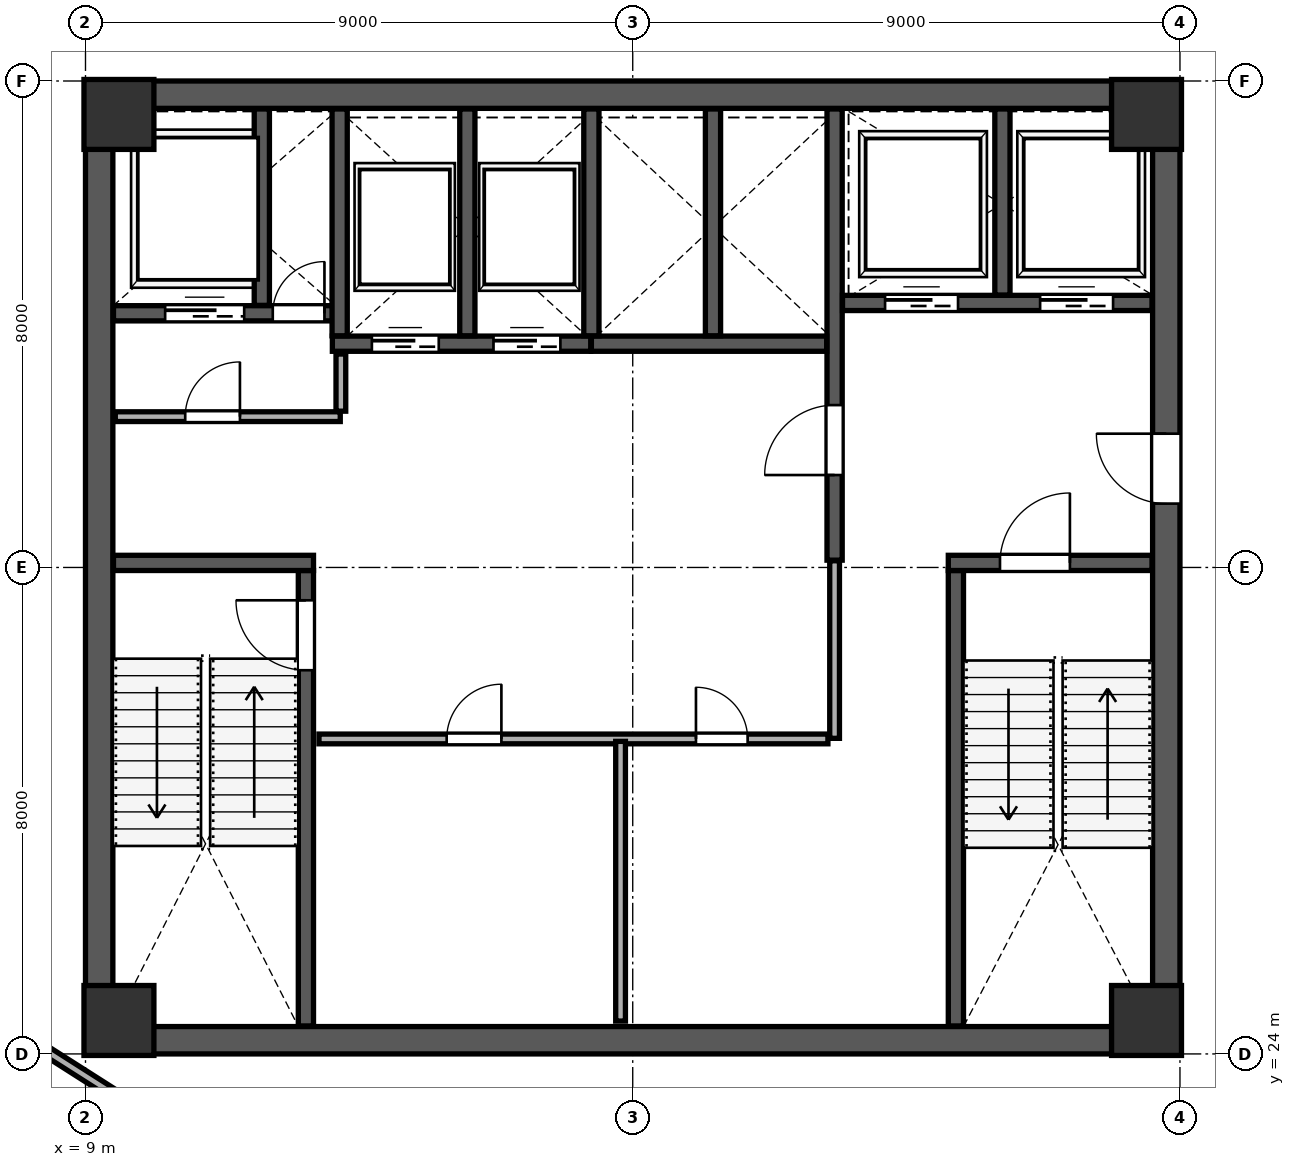
"""IFC4 building model, lengths in metres.
Left out: names, types, materials, properties, quantities, classifications, styles, units other than length and angle.
Written with IfcOpenShell. Run it as: python <this file> out.ifc"""

import sys

from ifc_helpers import new_model, si_unit, direction, frame, frame_2d, origin, origin_2d, place, context, subcontext, project, spatial, rectangle, extrude, clip, halfspace, source, transform, mapped, element, fill, save


model = new_model("IFC4")
c1 = context("Model", 3, precision=1e-05, world=origin(), true_north=direction((0.0, 1.0)))
c2 = subcontext(c1, "Body", "Model", "MODEL_VIEW")
j1 = project(units=[si_unit("LENGTHUNIT", "METRE"), si_unit("PLANEANGLEUNIT", "RADIAN")], contexts=[c1])
p1 = place(None, origin())
s1 = spatial("IfcSite", under=j1, at=p1, CompositionType="ELEMENT")
p2 = place(p1, origin())
s2 = spatial("IfcBuilding", under=s1, at=p2, CompositionType="ELEMENT")
p3 = place(p2, frame((0.0, 0.0, 191.8)))
s3 = spatial("IfcBuildingStorey", under=s2, at=p3, CompositionType="ELEMENT", Elevation=191.8)
m1 = source(origin(), c2, "Body", "SweptSolid", [
    extrude(rectangle(XDim=1.15, YDim=1.15, at=origin_2d()), origin(), (0.0, 0.0, 1.0), 4.198),
])
for number, where, z_axis, x_axis in (
    (1, (9.55, 24.55, 0.001), (0.0, 0.0, 1.0), (1.0, 0.0, 0.0)),
    (2, (26.45, 24.55, 0.001), (0.0, 0.0, 1.0), (1.0, 0.0, 0.0)),
    (3, (9.55, 39.45, 0.001), (0.0, 0.0, 1.0), (1.0, 0.0, 0.0)),
    (4, (26.45, 39.45, 0.001), (0.0, 0.0, 1.0), (1.0, 0.0, 0.0)),
):
    element("IfcColumn", number, at=place(p3, frame(where, z_axis=z_axis, x_axis=x_axis)), inside=s3, PredefinedType="COLUMN", context=c2, shape_type="MappedRepresentation", body=[
        mapped(m1, transform((0.0, 0.0, 0.0), scale=1.0)),
    ])
p4 = place(p3, frame((7.289, 41.053, 0.0), z_axis=(0.095793792698, 0.143375766237, 0.98502128857), x_axis=(0.407247881102, -0.908606350461, 0.092648061179)))
e5 = element("IfcColumn", 5, at=p4, inside=s3, PredefinedType="PILASTER", context=c2, shape_type="Clipping", body=[
    clip(clip(extrude(rectangle(XDim=0.9, YDim=1.3, at=origin_2d()), origin(), (0.0, 0.0, 1.0), 4.264), halfspace(frame((0.0, 0.0, 0.139), z_axis=(0.0, 0.0, -1.0), x_axis=(1.0, 0.0, 0.0)), False)), halfspace(frame((0.0, 0.0, 4.125), z_axis=(0.0, 0.0, 1.0), x_axis=(1.0, 0.0, 0.0)), False)),
])
p5 = place(p3, frame((9.225, 24.45, 0.0), z_axis=(0.0, 0.0, 1.0), x_axis=(0.0, 1.0, 0.0)))
e6 = element("IfcWall", 6, at=p5, inside=s3, PredefinedType="SHEAR", context=c2, shape_type="SweptSolid", body=[
    extrude(rectangle(XDim=15.1, YDim=0.45, at=frame_2d((7.55, 0.0))), origin(), (0.0, 0.0, 1.0), 3.96),
])
p6 = place(p3, frame((26.775, 24.45, 0.0), z_axis=(0.0, 0.0, 1.0), x_axis=(0.0, 1.0, 0.0)))
e7 = element("IfcWall", 7, at=p6, inside=s3, PredefinedType="SHEAR", context=c2, shape_type="SweptSolid", body=[
    extrude(rectangle(XDim=15.1, YDim=0.45, at=frame_2d((7.55, 0.0))), origin(), (0.0, 0.0, 1.0), 3.96),
])
p7 = place(p6, frame((8.6, 0.0, 0.0)))
e8 = element("IfcOpeningElement", 8, at=p7, cuts=e7, PredefinedType="OPENING", context=c2, shape_type="SweptSolid", body=[
    extrude(rectangle(XDim=1.15, YDim=2.2, at=frame_2d((0.575, 1.1))), frame((0.0, 0.235, 0.0), z_axis=(0.0, -1.0, 0.0), x_axis=(1.0, 0.0, 0.0)), (0.0, 0.0, 1.0), 0.47),
])
for number, where, z_axis, x_axis in (
    (9, (9.0, 24.225, 0.0), (0.0, 0.0, 1.0), (1.0, 0.0, 0.0)),
    (10, (9.0, 39.775, 0.0), (0.0, 0.0, 1.0), (1.0, 0.0, 0.0)),
):
    element("IfcWall", number, at=place(p3, frame(where, z_axis=z_axis, x_axis=x_axis)), inside=s3, PredefinedType="SHEAR", context=c2, shape_type="SweptSolid", body=[
        extrude(rectangle(XDim=18.0, YDim=0.45, at=frame_2d((9.0, 0.0))), origin(), (0.0, 0.0, 1.0), 3.96),
    ])
p8 = place(p3, frame((12.625, 24.46, 0.0), z_axis=(0.0, 0.0, 1.0), x_axis=(0.0, 1.0, 0.0)))
e11 = element("IfcWall", 11, at=p8, inside=s3, PredefinedType="SHEAR", context=c2, shape_type="SweptSolid", body=[
    extrude(rectangle(XDim=7.49, YDim=0.25, at=frame_2d((3.745, 0.0))), origin(), (0.0, 0.0, 1.0), 3.96),
])
p9 = place(p8, frame((5.85, 0.0, 0.0)))
e12 = element("IfcOpeningElement", 12, at=p9, cuts=e11, PredefinedType="OPENING", context=c2, shape_type="SweptSolid", body=[
    extrude(rectangle(XDim=1.15, YDim=2.2, at=frame_2d((0.575, 1.1))), frame((0.0, 0.135, 0.0), z_axis=(0.0, -1.0, 0.0), x_axis=(1.0, 0.0, 0.0)), (0.0, 0.0, 1.0), 0.27),
])
p10 = place(p3, frame((9.46, 32.075, 0.0), z_axis=(0.0, 0.0, 1.0), x_axis=(1.0, 0.0, 0.0)))
e13 = element("IfcWall", 13, at=p10, inside=s3, PredefinedType="SHEAR", context=c2, shape_type="SweptSolid", body=[
    extrude(rectangle(XDim=3.29, YDim=0.25, at=frame_2d((1.645, 0.0))), origin(), (0.0, 0.0, 1.0), 3.96),
])
p11 = place(p3, frame((23.315, 24.46, 0.0), z_axis=(0.0, 0.0, 1.0), x_axis=(0.0, 1.0, 0.0)))
e14 = element("IfcWall", 14, at=p11, inside=s3, PredefinedType="SHEAR", context=c2, shape_type="SweptSolid", body=[
    extrude(rectangle(XDim=7.49, YDim=0.25, at=frame_2d((3.745, 0.0))), origin(), (0.0, 0.0, 1.0), 3.96),
])
p12 = place(p3, frame((23.19, 32.075, 0.0), z_axis=(0.0, 0.0, 1.0), x_axis=(1.0, 0.0, 0.0)))
e15 = element("IfcWall", 15, at=p12, inside=s3, PredefinedType="SHEAR", context=c2, shape_type="SweptSolid", body=[
    extrude(rectangle(XDim=3.35, YDim=0.25, at=frame_2d((1.675, 0.0))), origin(), (0.0, 0.0, 1.0), 3.96),
])
p13 = place(p12, frame((0.85, 0.0, 0.0)))
e16 = element("IfcOpeningElement", 16, at=p13, cuts=e15, PredefinedType="OPENING", context=c2, shape_type="SweptSolid", body=[
    extrude(rectangle(XDim=1.15, YDim=2.2, at=frame_2d((0.575, 1.1))), frame((0.0, 0.135, 0.0), z_axis=(0.0, -1.0, 0.0), x_axis=(1.0, 0.0, 0.0)), (0.0, 0.0, 1.0), 0.27),
])
p14 = place(p3, frame((21.32, 32.12, 0.0), z_axis=(0.0, 0.0, 1.0), x_axis=(0.0, 1.0, 0.0)))
e17 = element("IfcWall", 17, at=p14, inside=s3, PredefinedType="SHEAR", context=c2, shape_type="SweptSolid", body=[
    extrude(rectangle(XDim=7.42, YDim=0.25, at=frame_2d((3.71, 0.0))), origin(), (0.0, 0.0, 1.0), 3.96),
])
p15 = place(p14, frame((1.4, 0.0, 0.0)))
e18 = element("IfcOpeningElement", 18, at=p15, cuts=e17, PredefinedType="OPENING", context=c2, shape_type="SweptSolid", body=[
    extrude(rectangle(XDim=1.15, YDim=2.2, at=frame_2d((0.575, 1.1))), frame((0.0, 0.135, 0.0), z_axis=(0.0, -1.0, 0.0), x_axis=(1.0, 0.0, 0.0)), (0.0, 0.0, 1.0), 0.27),
])
p16 = place(p3, frame((9.46, 36.18, 0.0), z_axis=(0.0, 0.0, 1.0), x_axis=(1.0, 0.0, 0.0)))
e19 = element("IfcWall", 19, at=p16, inside=s3, PredefinedType="SHEAR", context=c2, shape_type="SweptSolid", body=[
    extrude(rectangle(XDim=3.79, YDim=0.25, at=frame_2d((1.895, 0.0))), origin(), (0.0, 0.0, 1.0), 3.96),
])
p17 = place(p16, frame((2.62, 0.0, 0.0)))
e20 = element("IfcOpeningElement", 20, at=p17, cuts=e19, PredefinedType="OPENING", context=c2, shape_type="SweptSolid", body=[
    extrude(rectangle(XDim=0.85, YDim=2.1, at=frame_2d((0.425, 1.05))), frame((0.0, 0.135, 0.0), z_axis=(0.0, -1.0, 0.0), x_axis=(1.0, 0.0, 0.0)), (0.0, 0.0, 1.0), 0.27),
])
p18 = place(p16, frame((0.85, 0.0, 0.0)))
e21 = element("IfcOpeningElement", 21, at=p18, cuts=e19, PredefinedType="OPENING", context=c2, shape_type="SweptSolid", body=[
    extrude(rectangle(XDim=1.3, YDim=2.25, at=frame_2d((0.65, 1.125))), frame((0.0, 0.135, 0.0), z_axis=(0.0, -1.0, 0.0), x_axis=(1.0, 0.0, 0.0)), (0.0, 0.0, 1.0), 0.27),
])
p19 = place(p3, frame((11.9, 36.31, 0.0), z_axis=(0.0, 0.0, 1.0), x_axis=(0.0, 1.0, 0.0)))
e22 = element("IfcWall", 22, at=p19, inside=s3, PredefinedType="SHEAR", context=c2, shape_type="SweptSolid", body=[
    extrude(rectangle(XDim=3.23, YDim=0.25, at=frame_2d((1.615, 0.0))), origin(), (0.0, 0.0, 1.0), 3.96),
])
p20 = place(p3, frame((21.45, 36.35, 0.0), z_axis=(0.0, 0.0, 1.0), x_axis=(1.0, 0.0, 0.0)))
e23 = element("IfcWall", 23, at=p20, inside=s3, PredefinedType="SHEAR", context=c2, shape_type="SweptSolid", body=[
    extrude(rectangle(XDim=5.09, YDim=0.25, at=frame_2d((2.545, 0.0))), origin(), (0.0, 0.0, 1.0), 3.96),
])
p21 = place(p20, frame((0.7, 0.0, 0.0)))
e24 = element("IfcOpeningElement", 24, at=p21, cuts=e23, PredefinedType="OPENING", context=c2, shape_type="SweptSolid", body=[
    extrude(rectangle(XDim=1.2, YDim=2.2, at=frame_2d((0.6, 1.1))), frame((0.0, 0.135, 0.0), z_axis=(0.0, -1.0, 0.0), x_axis=(1.0, 0.0, 0.0)), (0.0, 0.0, 1.0), 0.27),
])
p22 = place(p20, frame((3.25, 0.0, 0.0)))
e25 = element("IfcOpeningElement", 25, at=p22, cuts=e23, PredefinedType="OPENING", context=c2, shape_type="SweptSolid", body=[
    extrude(rectangle(XDim=1.2, YDim=2.2, at=frame_2d((0.6, 1.1))), frame((0.0, 0.135, 0.0), z_axis=(0.0, -1.0, 0.0), x_axis=(1.0, 0.0, 0.0)), (0.0, 0.0, 1.0), 0.27),
])
p23 = place(p3, frame((24.08, 36.48, 0.0), z_axis=(0.0, 0.0, 1.0), x_axis=(0.0, 1.0, 0.0)))
e26 = element("IfcWall", 26, at=p23, inside=s3, PredefinedType="SHEAR", context=c2, shape_type="SweptSolid", body=[
    extrude(rectangle(XDim=3.06, YDim=0.25, at=frame_2d((1.53, 0.0))), origin(), (0.0, 0.0, 1.0), 3.96),
])
p24 = place(p3, frame((13.06, 35.68, 0.0), z_axis=(0.0, 0.0, 1.0), x_axis=(1.0, 0.0, 0.0)))
e27 = element("IfcWall", 27, at=p24, inside=s3, PredefinedType="SHEAR", context=c2, shape_type="SweptSolid", body=[
    extrude(rectangle(XDim=4.25, YDim=0.25, at=frame_2d((2.125, 0.0))), origin(), (0.0, 0.0, 1.0), 3.96),
])
p25 = place(p24, frame((0.65, 0.0, 0.0)))
e28 = element("IfcOpeningElement", 28, at=p25, cuts=e27, PredefinedType="OPENING", context=c2, shape_type="SweptSolid", body=[
    extrude(rectangle(XDim=1.1, YDim=2.2, at=frame_2d((0.55, 1.1))), frame((0.0, 0.135, 0.0), z_axis=(0.0, -1.0, 0.0), x_axis=(1.0, 0.0, 0.0)), (0.0, 0.0, 1.0), 0.27),
])
p26 = place(p24, frame((2.65, 0.0, 0.0)))
e29 = element("IfcOpeningElement", 29, at=p26, cuts=e27, PredefinedType="OPENING", context=c2, shape_type="SweptSolid", body=[
    extrude(rectangle(XDim=1.1, YDim=2.2, at=frame_2d((0.55, 1.1))), frame((0.0, 0.135, 0.0), z_axis=(0.0, -1.0, 0.0), x_axis=(1.0, 0.0, 0.0)), (0.0, 0.0, 1.0), 0.27),
])
for number, where, z_axis, x_axis in (
    (30, (13.18, 35.81, 0.0), (0.0, 0.0, 1.0), (0.0, 1.0, 0.0)),
    (31, (15.28, 35.81, 0.0), (0.0, 0.0, 1.0), (0.0, 1.0, 0.0)),
):
    element("IfcWall", number, at=place(p3, frame(where, z_axis=z_axis, x_axis=x_axis)), inside=s3, PredefinedType="SHEAR", context=c2, shape_type="SweptSolid", body=[
        extrude(rectangle(XDim=3.73, YDim=0.25, at=frame_2d((1.865, 0.0))), origin(), (0.0, 0.0, 1.0), 3.96),
    ])
p27 = place(p3, frame((17.32, 35.68, 0.0), z_axis=(0.0, 0.0, 1.0), x_axis=(1.0, 0.0, 0.0)))
e32 = element("IfcWall", 32, at=p27, inside=s3, PredefinedType="SHEAR", context=c2, shape_type="SweptSolid", body=[
    extrude(rectangle(XDim=3.87, YDim=0.25, at=frame_2d((1.935, 0.0))), origin(), (0.0, 0.0, 1.0), 3.96),
])
for number, where, z_axis, x_axis in (
    (33, (17.32, 35.81, 0.0), (0.0, 0.0, 1.0), (0.0, 1.0, 0.0)),
    (34, (19.32, 35.81, 0.0), (0.0, 0.0, 1.0), (0.0, 1.0, 0.0)),
):
    element("IfcWall", number, at=place(p3, frame(where, z_axis=z_axis, x_axis=x_axis)), inside=s3, PredefinedType="SHEAR", context=c2, shape_type="SweptSolid", body=[
        extrude(rectangle(XDim=3.73, YDim=0.25, at=frame_2d((1.865, 0.0))), origin(), (0.0, 0.0, 1.0), 3.96),
    ])
p28 = place(p3, frame((9.49, 34.48, 0.0), z_axis=(0.0, 0.0, 1.0), x_axis=(1.0, 0.0, 0.0)))
e35 = element("IfcWall", 35, at=p28, inside=s3, PredefinedType="PARTITIONING", context=c2, shape_type="SweptSolid", body=[
    extrude(rectangle(XDim=3.7, YDim=0.16, at=frame_2d((1.85, 0.0))), origin(), (0.0, 0.0, 1.0), 3.96),
])
p29 = place(p28, frame((1.15, 0.0, 0.0)))
e36 = element("IfcOpeningElement", 36, at=p29, cuts=e35, PredefinedType="OPENING", context=c2, shape_type="SweptSolid", body=[
    extrude(rectangle(XDim=0.9, YDim=2.15, at=frame_2d((0.45, 1.075))), frame((0.0, 0.09, 0.0), z_axis=(0.0, -1.0, 0.0), x_axis=(1.0, 0.0, 0.0)), (0.0, 0.0, 1.0), 0.18),
])
p30 = place(p3, frame((13.2, 34.57, 0.0), z_axis=(0.0, 0.0, 1.0), x_axis=(0.0, 1.0, 0.0)))
e37 = element("IfcWall", 37, at=p30, inside=s3, PredefinedType="PARTITIONING", context=c2, shape_type="SweptSolid", body=[
    extrude(rectangle(XDim=0.94, YDim=0.16, at=frame_2d((0.47, 0.0))), origin(), (0.0, 0.0, 1.0), 3.96),
])
p31 = place(p3, frame((12.84, 29.18, 0.0), z_axis=(0.0, 0.0, 1.0), x_axis=(1.0, 0.0, 0.0)))
e38 = element("IfcWall", 38, at=p31, inside=s3, PredefinedType="PARTITIONING", context=c2, shape_type="SweptSolid", body=[
    extrude(rectangle(XDim=8.37, YDim=0.16, at=frame_2d((4.185, 0.0))), origin(), (0.0, 0.0, 1.0), 3.96),
])
p32 = place(p31, frame((2.1, 0.0, 0.0)))
e39 = element("IfcOpeningElement", 39, at=p32, cuts=e38, PredefinedType="OPENING", context=c2, shape_type="SweptSolid", body=[
    extrude(rectangle(XDim=0.9, YDim=2.15, at=frame_2d((0.45, 1.075))), frame((0.0, 0.09, 0.0), z_axis=(0.0, -1.0, 0.0), x_axis=(1.0, 0.0, 0.0)), (0.0, 0.0, 1.0), 0.18),
])
p33 = place(p31, frame((6.2, 0.0, 0.0)))
e40 = element("IfcOpeningElement", 40, at=p33, cuts=e38, PredefinedType="OPENING", context=c2, shape_type="SweptSolid", body=[
    extrude(rectangle(XDim=0.85, YDim=2.1, at=frame_2d((0.425, 1.05))), frame((0.0, 0.09, 0.0), z_axis=(0.0, -1.0, 0.0), x_axis=(1.0, 0.0, 0.0)), (0.0, 0.0, 1.0), 0.18),
])
p34 = place(p3, frame((17.8, 24.54, 0.0), z_axis=(0.0, 0.0, 1.0), x_axis=(0.0, 1.0, 0.0)))
e41 = element("IfcWall", 41, at=p34, inside=s3, PredefinedType="PARTITIONING", context=c2, shape_type="SweptSolid", body=[
    extrude(rectangle(XDim=4.6, YDim=0.16, at=frame_2d((2.3, 0.0))), origin(), (0.0, 0.0, 1.0), 3.96),
])
p35 = place(p3, frame((21.32, 29.19, 0.0), z_axis=(0.0, 0.0, 1.0), x_axis=(0.0, 1.0, 0.0)))
e42 = element("IfcWall", 42, at=p35, inside=s3, PredefinedType="PARTITIONING", context=c2, shape_type="SweptSolid", body=[
    extrude(rectangle(XDim=2.92, YDim=0.16, at=frame_2d((1.46, 0.0))), origin(), (0.0, 0.0, 1.0), 3.96),
])
p36 = place(p3, frame((6.25, 25.389, 0.0), z_axis=(0.0, 0.0, 1.0), x_axis=(0.843390478307, -0.537301127024, 0.0)))
e43 = element("IfcWall", 43, at=p36, inside=s3, PredefinedType="PARTITIONING", context=c2, shape_type="SweptSolid", body=[
    extrude(rectangle(XDim=20.15, YDim=0.16, at=frame_2d((10.075, 0.0))), origin(), (0.0, 0.0, 1.0), 3.96),
])
p37 = place(p36, frame((0.65, 0.0, 0.0)))
e44 = element("IfcOpeningElement", 44, at=p37, cuts=e43, PredefinedType="OPENING", context=c2, shape_type="SweptSolid", body=[
    extrude(rectangle(XDim=0.95, YDim=2.15, at=frame_2d((0.475, 1.075))), frame((0.0, 0.09, 0.0), z_axis=(0.0, -1.0, 0.0), x_axis=(1.0, 0.0, 0.0)), (0.0, 0.0, 1.0), 0.18),
])
p38 = place(p3, frame((12.747, 50.868, 0.0), z_axis=(0.0, 0.0, 1.0), x_axis=(0.843393047262, -0.537297094567, 0.0)))
e45 = element("IfcWall", 45, at=p38, inside=s3, PredefinedType="PARTITIONING", context=c2, shape_type="SweptSolid", body=[
    extrude(rectangle(XDim=28.36, YDim=0.135, at=frame_2d((14.18, 0.0))), origin(), (0.0, 0.0, 1.0), 3.96),
])
p39 = place(p38, frame((20.31, 0.0, 0.0)))
e46 = element("IfcOpeningElement", 46, at=p39, cuts=e45, PredefinedType="OPENING", context=c2, shape_type="SweptSolid", body=[
    extrude(rectangle(XDim=0.95, YDim=2.15, at=frame_2d((0.475, 1.075))), frame((0.0, 0.078, 0.0), z_axis=(0.0, -1.0, 0.0), x_axis=(1.0, 0.0, 0.0)), (0.0, 0.0, 1.0), 0.155),
])
m2 = source(origin(), c2, "Body", "SweptSolid", [
    extrude(rectangle(XDim=1.15, YDim=2.2, at=frame_2d((0.575, 1.1))), frame((0.0, 0.025, 0.0), z_axis=(0.0, -1.0, 0.0), x_axis=(1.0, 0.0, 0.0)), (0.0, 0.0, 1.0), 0.05),
])
p40 = place(p9, origin())
e47 = element("IfcDoor", 47, at=p40, inside=s3, OperationType="SINGLE_SWING_RIGHT", PredefinedType="DOOR", context=c2, shape_type="MappedRepresentation", body=[
    mapped(m2, transform((0.0, 0.0, 0.0), scale=1.0)),
])
fill(e12, e47)
m3 = source(origin(), c2, "Body", "SweptSolid", [
    extrude(rectangle(XDim=1.15, YDim=2.2, at=frame_2d((0.575, 1.1))), frame((0.0, 0.025, 0.0), z_axis=(0.0, -1.0, 0.0), x_axis=(1.0, 0.0, 0.0)), (0.0, 0.0, 1.0), 0.05),
])
p41 = place(p15, origin())
e48 = element("IfcDoor", 48, at=p41, inside=s3, OperationType="SINGLE_SWING_LEFT", PredefinedType="DOOR", context=c2, shape_type="MappedRepresentation", body=[
    mapped(m3, transform((0.0, 0.0, 0.0), scale=1.0)),
])
fill(e18, e48)
p42 = place(p13, origin())
e49 = element("IfcDoor", 49, at=p42, inside=s3, OperationType="SINGLE_SWING_RIGHT", PredefinedType="DOOR", context=c2, shape_type="MappedRepresentation", body=[
    mapped(m2, transform((0.0, 0.0, 0.0), scale=1.0)),
])
fill(e16, e49)
p43 = place(p7, origin())
e50 = element("IfcDoor", 50, at=p43, inside=s3, OperationType="SINGLE_SWING_RIGHT", PredefinedType="DOOR", context=c2, shape_type="MappedRepresentation", body=[
    mapped(m3, transform((0.0, 0.0, 0.0), scale=1.0)),
])
fill(e8, e50)
m4 = source(origin(), c2, "Body", "SweptSolid", [
    extrude(rectangle(XDim=0.85, YDim=2.1, at=frame_2d((0.425, 1.05))), frame((0.0, 0.025, 0.0), z_axis=(0.0, -1.0, 0.0), x_axis=(1.0, 0.0, 0.0)), (0.0, 0.0, 1.0), 0.05),
])
p44 = place(p17, origin())
e51 = element("IfcDoor", 51, at=p44, inside=s3, OperationType="SINGLE_SWING_RIGHT", PredefinedType="DOOR", context=c2, shape_type="MappedRepresentation", body=[
    mapped(m4, transform((0.0, 0.0, 0.0), scale=1.0)),
])
fill(e20, e51)
m5 = source(origin(), c2, "Body", "SweptSolid", [
    extrude(rectangle(XDim=1.1, YDim=2.2, at=frame_2d((0.55, 1.1))), frame((0.0, 0.025, 0.0), z_axis=(0.0, -1.0, 0.0), x_axis=(1.0, 0.0, 0.0)), (0.0, 0.0, 1.0), 0.05),
])
p45 = place(p25, origin())
e52 = element("IfcDoor", 52, at=p45, inside=s3, OperationType="SLIDING_TO_LEFT", PredefinedType="DOOR", context=c2, shape_type="MappedRepresentation", body=[
    mapped(m5, transform((0.0, 0.0, 0.0), scale=1.0)),
])
fill(e28, e52)
p46 = place(p26, origin())
e53 = element("IfcDoor", 53, at=p46, inside=s3, OperationType="SLIDING_TO_RIGHT", PredefinedType="DOOR", context=c2, shape_type="MappedRepresentation", body=[
    mapped(m5, transform((0.0, 0.0, 0.0), scale=1.0)),
])
fill(e29, e53)
m6 = source(origin(), c2, "Body", "SweptSolid", [
    extrude(rectangle(XDim=1.2, YDim=2.2, at=frame_2d((0.6, 1.1))), frame((0.0, 0.025, 0.0), z_axis=(0.0, -1.0, 0.0), x_axis=(1.0, 0.0, 0.0)), (0.0, 0.0, 1.0), 0.05),
])
p47 = place(p21, origin())
e54 = element("IfcDoor", 54, at=p47, inside=s3, OperationType="SLIDING_TO_LEFT", PredefinedType="DOOR", context=c2, shape_type="MappedRepresentation", body=[
    mapped(m6, transform((0.0, 0.0, 0.0), scale=1.0)),
])
fill(e24, e54)
p48 = place(p22, origin())
e55 = element("IfcDoor", 55, at=p48, inside=s3, OperationType="SLIDING_TO_RIGHT", PredefinedType="DOOR", context=c2, shape_type="MappedRepresentation", body=[
    mapped(m6, transform((0.0, 0.0, 0.0), scale=1.0)),
])
fill(e25, e55)
m7 = source(origin(), c2, "Body", "SweptSolid", [
    extrude(rectangle(XDim=1.3, YDim=2.25, at=frame_2d((0.65, 1.125))), frame((0.0, 0.025, 0.0), z_axis=(0.0, -1.0, 0.0), x_axis=(1.0, 0.0, 0.0)), (0.0, 0.0, 1.0), 0.05),
])
p49 = place(p18, origin())
e56 = element("IfcDoor", 56, at=p49, inside=s3, OperationType="SLIDING_TO_LEFT", PredefinedType="DOOR", context=c2, shape_type="MappedRepresentation", body=[
    mapped(m7, transform((0.0, 0.0, 0.0), scale=1.0)),
])
fill(e21, e56)
m8 = source(origin(), c2, "Body", "SweptSolid", [
    extrude(rectangle(XDim=0.9, YDim=2.15, at=frame_2d((0.45, 1.075))), frame((0.0, 0.025, 0.0), z_axis=(0.0, -1.0, 0.0), x_axis=(1.0, 0.0, 0.0)), (0.0, 0.0, 1.0), 0.05),
])
p50 = place(p29, origin())
e57 = element("IfcDoor", 57, at=p50, inside=s3, OperationType="SINGLE_SWING_RIGHT", PredefinedType="DOOR", context=c2, shape_type="MappedRepresentation", body=[
    mapped(m8, transform((0.0, 0.0, 0.0), scale=1.0)),
])
fill(e36, e57)
p51 = place(p32, origin())
e58 = element("IfcDoor", 58, at=p51, inside=s3, OperationType="SINGLE_SWING_RIGHT", PredefinedType="DOOR", context=c2, shape_type="MappedRepresentation", body=[
    mapped(m8, transform((0.0, 0.0, 0.0), scale=1.0)),
])
fill(e39, e58)
p52 = place(p33, origin())
e59 = element("IfcDoor", 59, at=p52, inside=s3, OperationType="SINGLE_SWING_LEFT", PredefinedType="DOOR", context=c2, shape_type="MappedRepresentation", body=[
    mapped(m4, transform((0.0, 0.0, 0.0), scale=1.0)),
])
fill(e40, e59)
save(model, sys.argv[1])
